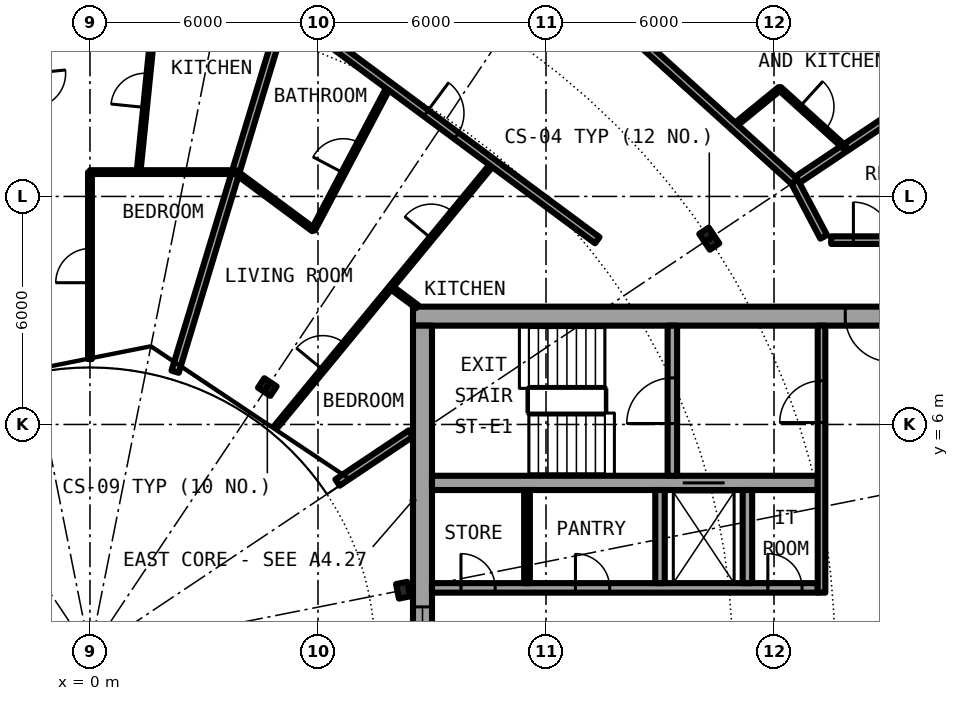
"""IFC4 building model, lengths in metres.
Left out: names, types, materials, properties, quantities, classifications, styles, units other than length and angle.
Written with IfcOpenShell. Run it as: python <this file> out.ifc"""

import sys

from ifc_helpers import new_model, si_unit, direction, frame, frame_2d, origin, origin_2d, place, context, subcontext, project, spatial, rectangle, i_section, extrude, element, fill, save


model = new_model("IFC4")
c1 = context("Model", 3, precision=1e-05, world=origin(), true_north=direction((0.0, 1.0)))
c2 = subcontext(c1, "Body", "Model", "MODEL_VIEW")
j1 = project(units=[si_unit("LENGTHUNIT", "METRE"), si_unit("PLANEANGLEUNIT", "RADIAN")], contexts=[c1])
p1 = place(None, origin())
s1 = spatial("IfcSite", under=j1, at=p1, CompositionType="ELEMENT")
p2 = place(p1, origin())
s2 = spatial("IfcBuilding", under=s1, at=p2, CompositionType="ELEMENT")
p3 = place(p2, frame((0.0, 0.0, 154.35)))
s3 = spatial("IfcBuildingStorey", under=s2, at=p3, CompositionType="ELEMENT", Elevation=154.35)
p4 = place(p3, frame((16.297, 10.889, 0.0), z_axis=(0.0, 0.0, 1.0), x_axis=(0.831469612303, 0.55557023302, 0.0)))
e1 = element("IfcColumn", 1, at=p4, inside=s3, PredefinedType="COLUMN", context=c2, shape_type="SweptSolid", body=[
    extrude(i_section(OverallWidth=0.3, OverallDepth=0.5, WebThickness=0.014, FlangeThickness=0.028, FilletRadius=0.027, at=origin_2d()), origin(), (0.0, 0.0, 1.0), 3.05),
])
for number, where, z_axis, x_axis in (
    (2, (8.239, 1.639, 0.0), (0.0, 0.0, 1.0), (0.981, 0.195, 0.0)),
    (3, (4.667, 6.984, 0.0), (0.0, 0.0, 1.0), (0.556, 0.831, 0.0)),
):
    element("IfcColumn", number, at=place(p3, frame(where, z_axis=z_axis, x_axis=x_axis)), inside=s3, PredefinedType="COLUMN", context=c2, shape_type="SweptSolid", body=[
        extrude(i_section(OverallWidth=0.3, OverallDepth=0.39, WebThickness=0.011, FlangeThickness=0.019, FilletRadius=0.027, at=origin_2d()), origin(), (0.0, 0.0, 1.0), 3.05),
    ])
p5 = place(p3, frame((22.699, 15.167, 0.0), z_axis=(0.0, 0.0, 1.0), x_axis=(-0.634382322723, 0.773019449054, 0.0)))
e4 = element("IfcWall", 4, at=p5, inside=s3, PredefinedType="SOLIDWALL", context=c2, shape_type="SweptSolid", body=[
    extrude(rectangle(XDim=5.352, YDim=0.25, at=frame_2d((2.676, 0.0))), origin(), (0.0, 0.0, 1.0), 2.7),
])
p6 = place(p5, frame((0.841, 0.0, 0.0)))
e5 = element("IfcOpeningElement", 5, at=p6, cuts=e4, PredefinedType="OPENING", context=c2, shape_type="SweptSolid", body=[
    extrude(rectangle(XDim=1.0, YDim=2.2, at=frame_2d((0.5, 1.1))), frame((0.0, 0.135, 0.0), z_axis=(0.0, -1.0, 0.0), x_axis=(1.0, 0.0, 0.0)), (0.0, 0.0, 1.0), 0.27),
])
p7 = place(p5, frame((3.111, 0.0, 0.3)))
e6 = element("IfcOpeningElement", 6, at=p7, cuts=e4, PredefinedType="OPENING", context=c2, shape_type="SweptSolid", body=[
    extrude(rectangle(XDim=1.8, YDim=2.1, at=frame_2d((0.9, 1.05))), frame((0.0, 0.135, 0.0), z_axis=(0.0, -1.0, 0.0), x_axis=(1.0, 0.0, 0.0)), (0.0, 0.0, 1.0), 0.27),
])
p8 = place(p3, frame((22.1, 8.85, 0.0), z_axis=(0.0, 0.0, 1.0), x_axis=(-1.0, 0.0, 0.0)))
e7 = element("IfcWall", 7, at=p8, inside=s3, PredefinedType="SHEAR", context=c2, shape_type="SweptSolid", body=[
    extrude(rectangle(XDim=13.6, YDim=0.5, at=frame_2d((6.8, 0.0))), origin(), (0.0, 0.0, 1.0), 3.05),
])
p9 = place(p8, frame((1.025, 0.0, 0.0)))
e8 = element("IfcOpeningElement", 8, at=p9, cuts=e7, PredefinedType="OPENING", context=c2, shape_type="SweptSolid", body=[
    extrude(rectangle(XDim=1.2, YDim=2.3, at=frame_2d((0.6, 1.15))), frame((0.0, 0.26, 0.0), z_axis=(0.0, -1.0, 0.0), x_axis=(1.0, 0.0, 0.0)), (0.0, 0.0, 1.0), 0.52),
])
p10 = place(p3, frame((8.75, -8.6, 0.0), z_axis=(0.0, 0.0, 1.0), x_axis=(0.0, 1.0, 0.0)))
e9 = element("IfcWall", 9, at=p10, inside=s3, PredefinedType="SHEAR", context=c2, shape_type="SweptSolid", body=[
    extrude(rectangle(XDim=17.2, YDim=0.5, at=frame_2d((8.6, 0.0))), origin(), (0.0, 0.0, 1.0), 3.05),
])
p11 = place(p10, frame((7.4, 0.0, 0.1)))
e10 = element("IfcOpeningElement", 10, at=p11, cuts=e9, PredefinedType="OPENING", context=c2, shape_type="SweptSolid", body=[
    extrude(rectangle(XDim=2.4, YDim=2.2, at=frame_2d((1.2, 1.1))), frame((0.0, 0.26, 0.0), z_axis=(0.0, -1.0, 0.0), x_axis=(1.0, 0.0, 0.0)), (0.0, 0.0, 1.0), 0.52),
])
p12 = place(p3, frame((9.0, 1.7, 0.0), z_axis=(0.0, 0.0, 1.0), x_axis=(1.0, 0.0, 0.0)))
e11 = element("IfcWall", 11, at=p12, inside=s3, PredefinedType="SHEAR", context=c2, shape_type="SweptSolid", body=[
    extrude(rectangle(XDim=10.15, YDim=0.25, at=frame_2d((5.075, 0.0))), origin(), (0.0, 0.0, 1.0), 3.05),
])
p13 = place(p12, frame((0.762, 0.0, 0.0)))
e12 = element("IfcOpeningElement", 12, at=p13, cuts=e11, PredefinedType="OPENING", context=c2, shape_type="SweptSolid", body=[
    extrude(rectangle(XDim=0.9, YDim=2.3, at=frame_2d((0.45, 1.15))), frame((0.0, 0.135, 0.0), z_axis=(0.0, -1.0, 0.0), x_axis=(1.0, 0.0, 0.0)), (0.0, 0.0, 1.0), 0.27),
])
p14 = place(p12, frame((3.775, 0.0, 0.0)))
e13 = element("IfcOpeningElement", 13, at=p14, cuts=e11, PredefinedType="OPENING", context=c2, shape_type="SweptSolid", body=[
    extrude(rectangle(XDim=0.9, YDim=2.3, at=frame_2d((0.45, 1.15))), frame((0.0, 0.135, 0.0), z_axis=(0.0, -1.0, 0.0), x_axis=(1.0, 0.0, 0.0)), (0.0, 0.0, 1.0), 0.27),
])
p15 = place(p12, frame((8.837, 0.0, 0.0)))
e14 = element("IfcOpeningElement", 14, at=p15, cuts=e11, PredefinedType="OPENING", context=c2, shape_type="SweptSolid", body=[
    extrude(rectangle(XDim=0.9, YDim=2.3, at=frame_2d((0.45, 1.15))), frame((0.0, 0.135, 0.0), z_axis=(0.0, -1.0, 0.0), x_axis=(1.0, 0.0, 0.0)), (0.0, 0.0, 1.0), 0.27),
])
p16 = place(p3, frame((9.0, 4.462, 0.0), z_axis=(0.0, 0.0, 1.0), x_axis=(1.0, 0.0, 0.0)))
e15 = element("IfcWall", 15, at=p16, inside=s3, PredefinedType="SHEAR", context=c2, shape_type="SweptSolid", body=[
    extrude(rectangle(XDim=10.15, YDim=0.375, at=frame_2d((5.075, 0.0))), origin(), (0.0, 0.0, 1.0), 3.05),
])
p17 = place(p16, frame((6.6, 0.0, 0.0)))
e16 = element("IfcOpeningElement", 16, at=p17, cuts=e15, PredefinedType="OPENING", context=c2, shape_type="SweptSolid", body=[
    extrude(rectangle(XDim=1.1, YDim=2.3, at=frame_2d((0.55, 1.15))), frame((0.0, 0.198, 0.0), z_axis=(0.0, -1.0, 0.0), x_axis=(1.0, 0.0, 0.0)), (0.0, 0.0, 1.0), 0.395),
])
p18 = place(p3, frame((15.325, 4.65, 0.0), z_axis=(0.0, 0.0, 1.0), x_axis=(0.0, 1.0, 0.0)))
e17 = element("IfcWall", 17, at=p18, inside=s3, PredefinedType="SHEAR", context=c2, shape_type="SweptSolid", body=[
    extrude(rectangle(XDim=3.95, YDim=0.25, at=frame_2d((1.975, 0.0))), origin(), (0.0, 0.0, 1.0), 3.05),
])
p19 = place(p18, frame((1.375, 0.0, 0.0)))
e18 = element("IfcOpeningElement", 18, at=p19, cuts=e17, PredefinedType="OPENING", context=c2, shape_type="SweptSolid", body=[
    extrude(rectangle(XDim=1.2, YDim=2.3, at=frame_2d((0.6, 1.15))), frame((0.0, 0.135, 0.0), z_axis=(0.0, -1.0, 0.0), x_axis=(1.0, 0.0, 0.0)), (0.0, 0.0, 1.0), 0.27),
])
for number, where, z_axis, x_axis in (
    (19, (15.0, 1.825, 0.0), (0.0, 0.0, 1.0), (0.0, 1.0, 0.0)),
    (20, (17.3, 1.825, 0.0), (0.0, 0.0, 1.0), (0.0, 1.0, 0.0)),
):
    element("IfcWall", number, at=place(p3, frame(where, z_axis=z_axis, x_axis=x_axis)), inside=s3, PredefinedType="SOLIDWALL", context=c2, shape_type="SweptSolid", body=[
        extrude(rectangle(XDim=2.45, YDim=0.25, at=frame_2d((1.225, 0.0))), origin(), (0.0, 0.0, 1.0), 2.7),
    ])
p20 = place(p3, frame((19.25, 1.575, 0.0), z_axis=(0.0, 0.0, 1.0), x_axis=(0.0, 1.0, 0.0)))
e21 = element("IfcWall", 21, at=p20, inside=s3, PredefinedType="SOLIDWALL", context=c2, shape_type="SweptSolid", body=[
    extrude(rectangle(XDim=7.025, YDim=0.2, at=frame_2d((3.513, 0.0))), origin(), (0.0, 0.0, 1.0), 2.7),
])
p21 = place(p20, frame((4.475, 0.0, 0.0)))
e22 = element("IfcOpeningElement", 22, at=p21, cuts=e21, PredefinedType="OPENING", context=c2, shape_type="SweptSolid", body=[
    extrude(rectangle(XDim=1.1, YDim=2.3, at=frame_2d((0.55, 1.15))), frame((0.0, 0.11, 0.0), z_axis=(0.0, -1.0, 0.0), x_axis=(1.0, 0.0, 0.0)), (0.0, 0.0, 1.0), 0.22),
])
p22 = place(p3, frame((11.5, 1.825, 0.0), z_axis=(0.0, 0.0, 1.0), x_axis=(0.0, 1.0, 0.0)))
e23 = element("IfcWall", 23, at=p22, inside=s3, PredefinedType="PARTITIONING", context=c2, shape_type="SweptSolid", body=[
    extrude(rectangle(XDim=2.45, YDim=0.15, at=frame_2d((1.225, 0.0))), origin(), (0.0, 0.0, 1.0), 2.7),
])
p23 = place(p3, frame((0.0, 7.72, 0.0), z_axis=(0.0, 0.0, 1.0), x_axis=(0.0, 1.0, 0.0)))
e24 = element("IfcWall", 24, at=p23, inside=s3, PredefinedType="PARTITIONING", context=c2, shape_type="SweptSolid", body=[
    extrude(rectangle(XDim=4.92, YDim=0.1, at=frame_2d((2.46, 0.0))), origin(), (0.0, 0.0, 1.0), 2.7),
])
p24 = place(p23, frame((2.01, 0.0, 0.0)))
e25 = element("IfcOpeningElement", 25, at=p24, cuts=e24, PredefinedType="OPENING", context=c2, shape_type="SweptSolid", body=[
    extrude(rectangle(XDim=0.9, YDim=2.3, at=frame_2d((0.45, 1.15))), frame((0.0, 0.06, 0.0), z_axis=(0.0, -1.0, 0.0), x_axis=(1.0, 0.0, 0.0)), (0.0, 0.0, 1.0), 0.12),
])
p25 = place(p3, frame((1.278, 12.64, 0.0), z_axis=(0.0, 0.0, 1.0), x_axis=(0.100650711003, 0.994921823248, 0.0)))
e26 = element("IfcWall", 26, at=p25, inside=s3, PredefinedType="PARTITIONING", context=c2, shape_type="SweptSolid", body=[
    extrude(rectangle(XDim=4.32, YDim=0.1, at=frame_2d((2.16, 0.0))), origin(), (0.0, 0.0, 1.0), 2.7),
])
p26 = place(p25, frame((1.71, 0.0, 0.0)))
e27 = element("IfcOpeningElement", 27, at=p26, cuts=e26, PredefinedType="OPENING", context=c2, shape_type="SweptSolid", body=[
    extrude(rectangle(XDim=0.9, YDim=2.3, at=frame_2d((0.45, 1.15))), frame((0.0, 0.06, 0.0), z_axis=(0.0, -1.0, 0.0), x_axis=(1.0, 0.0, 0.0)), (0.0, 0.0, 1.0), 0.12),
])
p27 = place(p3, frame((2.241, 7.388, 0.0), z_axis=(0.0, 0.0, 1.0), x_axis=(0.290284403441, 0.956940418793, 0.0)))
e28 = element("IfcWall", 28, at=p27, inside=s3, PredefinedType="PARTITIONING", context=c2, shape_type="SweptSolid", body=[
    extrude(rectangle(XDim=9.98, YDim=0.2, at=frame_2d((4.99, 0.0))), origin(), (0.0, 0.0, 1.0), 2.7),
])
p28 = place(p3, frame((4.909, 5.958, 0.0), z_axis=(0.0, 0.0, 1.0), x_axis=(0.635879010442, 0.771788756124, 0.0)))
e29 = element("IfcWall", 29, at=p28, inside=s3, PredefinedType="PARTITIONING", context=c2, shape_type="SweptSolid", body=[
    extrude(rectangle(XDim=8.967, YDim=0.1, at=frame_2d((4.484, 0.0))), origin(), (0.0, 0.0, 1.0), 2.7),
])
p29 = place(p28, frame((6.4, 0.0, 0.0)))
e30 = element("IfcOpeningElement", 30, at=p29, cuts=e29, PredefinedType="OPENING", context=c2, shape_type="SweptSolid", body=[
    extrude(rectangle(XDim=0.9, YDim=2.3, at=frame_2d((0.45, 1.15))), frame((0.0, 0.06, 0.0), z_axis=(0.0, -1.0, 0.0), x_axis=(1.0, 0.0, 0.0)), (0.0, 0.0, 1.0), 0.12),
])
p30 = place(p28, frame((1.917, 0.0, 0.0)))
e31 = element("IfcOpeningElement", 31, at=p30, cuts=e29, PredefinedType="OPENING", context=c2, shape_type="SweptSolid", body=[
    extrude(rectangle(XDim=0.9, YDim=2.3, at=frame_2d((0.45, 1.15))), frame((0.0, 0.06, 0.0), z_axis=(0.0, -1.0, 0.0), x_axis=(1.0, 0.0, 0.0)), (0.0, 0.0, 1.0), 0.12),
])
p31 = place(p3, frame((5.877, 11.125, 0.0), z_axis=(0.0, 0.0, 1.0), x_axis=(0.467030118529, 0.884241408432, 0.0)))
e32 = element("IfcWall", 32, at=p31, inside=s3, PredefinedType="PARTITIONING", context=c2, shape_type="SweptSolid", body=[
    extrude(rectangle(XDim=4.278, YDim=0.1, at=frame_2d((2.139, 0.0))), origin(), (0.0, 0.0, 1.0), 2.7),
])
p32 = place(p31, frame((1.689, 0.0, 0.0)))
e33 = element("IfcOpeningElement", 33, at=p32, cuts=e32, PredefinedType="OPENING", context=c2, shape_type="SweptSolid", body=[
    extrude(rectangle(XDim=0.9, YDim=2.3, at=frame_2d((0.45, 1.15))), frame((0.0, 0.06, 0.0), z_axis=(0.0, -1.0, 0.0), x_axis=(1.0, 0.0, 0.0)), (0.0, 0.0, 1.0), 0.12),
])
p33 = place(p3, frame((16.936, 13.845, 0.0), z_axis=(0.0, 0.0, 1.0), x_axis=(0.774283039722, 0.632839453889, 0.0)))
e34 = element("IfcWall", 34, at=p33, inside=s3, PredefinedType="PARTITIONING", context=c2, shape_type="SweptSolid", body=[
    extrude(rectangle(XDim=1.569, YDim=0.1, at=frame_2d((0.785, 0.0))), origin(), (0.0, 0.0, 1.0), 2.7),
])
p34 = place(p3, frame((18.542, 12.389, 0.0), z_axis=(0.0, 0.0, 1.0), x_axis=(0.831387096605, 0.55569370664, 0.0)))
e35 = element("IfcWall", 35, at=p34, inside=s3, PredefinedType="PARTITIONING", context=c2, shape_type="SweptSolid", body=[
    extrude(rectangle(XDim=4.875, YDim=0.2, at=frame_2d((2.438, 0.0))), origin(), (0.0, 0.0, 1.0), 2.7),
])
p35 = place(p3, frame((6.513, 4.472, 0.0), z_axis=(0.0, 0.0, 1.0), x_axis=(0.83133816625, 0.555766905579, 0.0)))
e36 = element("IfcWall", 36, at=p35, inside=s3, PredefinedType="PARTITIONING", context=c2, shape_type="SweptSolid", body=[
    extrude(rectangle(XDim=2.323, YDim=0.2, at=frame_2d((1.162, 0.0))), origin(), (0.0, 0.0, 1.0), 2.7),
])
p36 = place(p3, frame((19.504, 10.85, 0.0), z_axis=(0.0, 0.0, 1.0), x_axis=(1.0, 0.0, 0.0)))
e37 = element("IfcWall", 37, at=p36, inside=s3, PredefinedType="PARTITIONING", context=c2, shape_type="SweptSolid", body=[
    extrude(rectangle(XDim=2.171, YDim=0.2, at=frame_2d((1.085, 0.0))), origin(), (0.0, 0.0, 1.0), 2.7),
])
p37 = place(p36, frame((0.585, 0.0, 0.0)))
e38 = element("IfcOpeningElement", 38, at=p37, cuts=e37, PredefinedType="OPENING", context=c2, shape_type="SweptSolid", body=[
    extrude(rectangle(XDim=1.0, YDim=2.3, at=frame_2d((0.5, 1.15))), frame((0.0, 0.11, 0.0), z_axis=(0.0, -1.0, 0.0), x_axis=(1.0, 0.0, 0.0)), (0.0, 0.0, 1.0), 0.22),
])
p38 = place(p3, frame((3.834, 12.64, 0.0), z_axis=(0.0, 0.0, 1.0), x_axis=(0.803259509791, -0.595629213463, 0.0)))
e39 = element("IfcWall", 39, at=p38, inside=s3, PredefinedType="PARTITIONING", context=c2, shape_type="SweptSolid", body=[
    extrude(rectangle(XDim=2.543, YDim=0.1, at=frame_2d((1.272, 0.0))), origin(), (0.0, 0.0, 1.0), 2.7),
])
p39 = place(p3, frame((7.918, 9.611, 0.0), z_axis=(0.0, 0.0, 1.0), x_axis=(0.803199066515, -0.595710718007, 0.0)))
e40 = element("IfcWall", 40, at=p39, inside=s3, PredefinedType="PARTITIONING", context=c2, shape_type="SweptSolid", body=[
    extrude(rectangle(XDim=0.858, YDim=0.1, at=frame_2d((0.429, 0.0))), origin(), (0.0, 0.0, 1.0), 2.7),
])
p40 = place(p3, frame((0.0, 12.64, 0.0), z_axis=(0.0, 0.0, 1.0), x_axis=(1.0, 0.0, 0.0)))
e41 = element("IfcWall", 41, at=p40, inside=s3, PredefinedType="PARTITIONING", context=c2, shape_type="SweptSolid", body=[
    extrude(rectangle(XDim=3.834, YDim=0.1, at=frame_2d((1.917, 0.0))), origin(), (0.0, 0.0, 1.0), 2.7),
])
p41 = place(p3, frame((5.137, 16.938, 0.0), z_axis=(0.0, 0.0, 1.0), x_axis=(0.803229232922, -0.595670042371, 0.0)))
e42 = element("IfcWall", 42, at=p41, inside=s3, PredefinedType="PARTITIONING", context=c2, shape_type="SweptSolid", body=[
    extrude(rectangle(XDim=10.224, YDim=0.2, at=frame_2d((5.112, 0.0))), origin(), (0.0, 0.0, 1.0), 2.7),
])
p42 = place(p41, frame((4.612, 0.0, 0.0)))
e43 = element("IfcOpeningElement", 43, at=p42, cuts=e42, PredefinedType="OPENING", context=c2, shape_type="SweptSolid", body=[
    extrude(rectangle(XDim=1.0, YDim=2.3, at=frame_2d((0.5, 1.15))), frame((0.0, 0.11, 0.0), z_axis=(0.0, -1.0, 0.0), x_axis=(1.0, 0.0, 0.0)), (0.0, 0.0, 1.0), 0.22),
])
p43 = place(p3, frame((10.512, 19.667, 0.0), z_axis=(0.0, 0.0, 1.0), x_axis=(0.740947367223, -0.671563101283, 0.0)))
e44 = element("IfcWall", 44, at=p43, inside=s3, PredefinedType="PARTITIONING", context=c2, shape_type="SweptSolid", body=[
    extrude(rectangle(XDim=10.837, YDim=0.2, at=frame_2d((5.419, 0.0))), origin(), (0.0, 0.0, 1.0), 2.7),
])
p44 = place(p43, frame((3.835, 0.0, 0.0)))
e45 = element("IfcOpeningElement", 45, at=p44, cuts=e44, PredefinedType="OPENING", context=c2, shape_type="SweptSolid", body=[
    extrude(rectangle(XDim=1.0, YDim=2.3, at=frame_2d((0.5, 1.15))), frame((0.0, 0.11, 0.0), z_axis=(0.0, -1.0, 0.0), x_axis=(1.0, 0.0, 0.0)), (0.0, 0.0, 1.0), 0.22),
])
p45 = place(p3, frame((18.542, 12.389, 0.0), z_axis=(0.0, 0.0, 1.0), x_axis=(0.465605550524, -0.884992356646, 0.0)))
e46 = element("IfcWall", 46, at=p45, inside=s3, PredefinedType="PARTITIONING", context=c2, shape_type="SweptSolid", body=[
    extrude(rectangle(XDim=1.643, YDim=0.2, at=frame_2d((0.821, 0.0))), origin(), (0.0, 0.0, 1.0), 2.7),
])
p46 = place(p3, frame((18.149, 14.84, 0.0), z_axis=(0.0, 0.0, 1.0), x_axis=(0.741127434804, -0.671364376014, 0.0)))
e47 = element("IfcWall", 47, at=p46, inside=s3, PredefinedType="PARTITIONING", context=c2, shape_type="SweptSolid", body=[
    extrude(rectangle(XDim=2.324, YDim=0.1, at=frame_2d((1.162, 0.0))), origin(), (0.0, 0.0, 1.0), 2.7),
])
p47 = place(p46, frame((0.714, 0.0, 0.0)))
e48 = element("IfcOpeningElement", 48, at=p47, cuts=e47, PredefinedType="OPENING", context=c2, shape_type="SweptSolid", body=[
    extrude(rectangle(XDim=0.9, YDim=2.3, at=frame_2d((0.45, 1.15))), frame((0.0, 0.06, 0.0), z_axis=(0.0, -1.0, 0.0), x_axis=(1.0, 0.0, 0.0)), (0.0, 0.0, 1.0), 0.12),
])
p48 = place(p17, origin())
e49 = element("IfcDoor", 49, at=p48, inside=s3, OperationType="DOUBLE_DOOR_SLIDING", PredefinedType="DOOR", context=c2, shape_type="SweptSolid", body=[
    extrude(rectangle(XDim=1.1, YDim=2.3, at=frame_2d((0.55, 1.15))), frame((0.0, 0.025, 0.0), z_axis=(0.0, -1.0, 0.0), x_axis=(1.0, 0.0, 0.0)), (0.0, 0.0, 1.0), 0.05),
])
fill(e16, e49)
p49 = place(p13, origin())
e50 = element("IfcDoor", 50, at=p49, inside=s3, OperationType="SINGLE_SWING_RIGHT", PredefinedType="DOOR", context=c2, shape_type="SweptSolid", body=[
    extrude(rectangle(XDim=0.9, YDim=2.3, at=frame_2d((0.45, 1.15))), frame((0.0, 0.025, 0.0), z_axis=(0.0, -1.0, 0.0), x_axis=(1.0, 0.0, 0.0)), (0.0, 0.0, 1.0), 0.05),
])
fill(e12, e50)
p50 = place(p14, origin())
e51 = element("IfcDoor", 51, at=p50, inside=s3, OperationType="SINGLE_SWING_RIGHT", PredefinedType="DOOR", context=c2, shape_type="SweptSolid", body=[
    extrude(rectangle(XDim=0.9, YDim=2.3, at=frame_2d((0.45, 1.15))), frame((0.0, 0.025, 0.0), z_axis=(0.0, -1.0, 0.0), x_axis=(1.0, 0.0, 0.0)), (0.0, 0.0, 1.0), 0.05),
])
fill(e13, e51)
p51 = place(p15, origin())
e52 = element("IfcDoor", 52, at=p51, inside=s3, OperationType="SINGLE_SWING_LEFT", PredefinedType="DOOR", context=c2, shape_type="SweptSolid", body=[
    extrude(rectangle(XDim=0.9, YDim=2.3, at=frame_2d((0.45, 1.15))), frame((0.0, 0.025, 0.0), z_axis=(0.0, -1.0, 0.0), x_axis=(1.0, 0.0, 0.0)), (0.0, 0.0, 1.0), 0.05),
])
fill(e14, e52)
p52 = place(p19, origin())
e53 = element("IfcDoor", 53, at=p52, inside=s3, OperationType="SINGLE_SWING_LEFT", PredefinedType="DOOR", context=c2, shape_type="SweptSolid", body=[
    extrude(rectangle(XDim=1.2, YDim=2.3, at=frame_2d((0.6, 1.15))), frame((0.0, 0.025, 0.0), z_axis=(0.0, -1.0, 0.0), x_axis=(1.0, 0.0, 0.0)), (0.0, 0.0, 1.0), 0.05),
])
fill(e18, e53)
p53 = place(p21, origin())
e54 = element("IfcDoor", 54, at=p53, inside=s3, OperationType="SINGLE_SWING_LEFT", PredefinedType="DOOR", context=c2, shape_type="SweptSolid", body=[
    extrude(rectangle(XDim=1.1, YDim=2.3, at=frame_2d((0.55, 1.15))), frame((0.0, 0.025, 0.0), z_axis=(0.0, -1.0, 0.0), x_axis=(1.0, 0.0, 0.0)), (0.0, 0.0, 1.0), 0.05),
])
fill(e22, e54)
p54 = place(p9, origin())
e55 = element("IfcDoor", 55, at=p54, inside=s3, OperationType="SINGLE_SWING_RIGHT", PredefinedType="DOOR", context=c2, shape_type="SweptSolid", body=[
    extrude(rectangle(XDim=1.2, YDim=2.3, at=frame_2d((0.6, 1.15))), frame((0.0, 0.025, 0.0), z_axis=(0.0, -1.0, 0.0), x_axis=(1.0, 0.0, 0.0)), (0.0, 0.0, 1.0), 0.05),
])
fill(e8, e55)
p55 = place(p11, origin())
e56 = element("IfcWindow", 56, at=p55, inside=s3, PartitioningType="SINGLE_PANEL", PredefinedType="WINDOW", context=c2, shape_type="SweptSolid", body=[
    extrude(rectangle(XDim=2.4, YDim=2.2, at=frame_2d((1.2, 1.1))), frame((0.0, 0.03, 0.0), z_axis=(0.0, -1.0, 0.0), x_axis=(1.0, 0.0, 0.0)), (0.0, 0.0, 1.0), 0.06),
])
fill(e10, e56)
p56 = place(p47, origin())
e57 = element("IfcDoor", 57, at=p56, inside=s3, OperationType="SINGLE_SWING_RIGHT", PredefinedType="DOOR", context=c2, shape_type="SweptSolid", body=[
    extrude(rectangle(XDim=0.9, YDim=2.3, at=frame_2d((0.45, 1.15))), frame((0.0, 0.025, 0.0), z_axis=(0.0, -1.0, 0.0), x_axis=(1.0, 0.0, 0.0)), (0.0, 0.0, 1.0), 0.05),
])
fill(e48, e57)
p57 = place(p42, origin())
e58 = element("IfcDoor", 58, at=p57, inside=s3, OperationType="SINGLE_SWING_RIGHT", PredefinedType="DOOR", context=c2, shape_type="SweptSolid", body=[
    extrude(rectangle(XDim=1.0, YDim=2.3, at=frame_2d((0.5, 1.15))), frame((0.0, 0.025, 0.0), z_axis=(0.0, -1.0, 0.0), x_axis=(1.0, 0.0, 0.0)), (0.0, 0.0, 1.0), 0.05),
])
fill(e43, e58)
p58 = place(p32, origin())
e59 = element("IfcDoor", 59, at=p58, inside=s3, OperationType="SINGLE_SWING_RIGHT", PredefinedType="DOOR", context=c2, shape_type="SweptSolid", body=[
    extrude(rectangle(XDim=0.9, YDim=2.3, at=frame_2d((0.45, 1.15))), frame((0.0, 0.025, 0.0), z_axis=(0.0, -1.0, 0.0), x_axis=(1.0, 0.0, 0.0)), (0.0, 0.0, 1.0), 0.05),
])
fill(e33, e59)
p59 = place(p29, origin())
e60 = element("IfcDoor", 60, at=p59, inside=s3, OperationType="SINGLE_SWING_RIGHT", PredefinedType="DOOR", context=c2, shape_type="SweptSolid", body=[
    extrude(rectangle(XDim=0.9, YDim=2.3, at=frame_2d((0.45, 1.15))), frame((0.0, 0.025, 0.0), z_axis=(0.0, -1.0, 0.0), x_axis=(1.0, 0.0, 0.0)), (0.0, 0.0, 1.0), 0.05),
])
fill(e30, e60)
p60 = place(p30, origin())
e61 = element("IfcDoor", 61, at=p60, inside=s3, OperationType="SINGLE_SWING_LEFT", PredefinedType="DOOR", context=c2, shape_type="SweptSolid", body=[
    extrude(rectangle(XDim=0.9, YDim=2.3, at=frame_2d((0.45, 1.15))), frame((0.0, 0.025, 0.0), z_axis=(0.0, -1.0, 0.0), x_axis=(1.0, 0.0, 0.0)), (0.0, 0.0, 1.0), 0.05),
])
fill(e31, e61)
p61 = place(p26, origin())
e62 = element("IfcDoor", 62, at=p61, inside=s3, OperationType="SINGLE_SWING_RIGHT", PredefinedType="DOOR", context=c2, shape_type="SweptSolid", body=[
    extrude(rectangle(XDim=0.9, YDim=2.3, at=frame_2d((0.45, 1.15))), frame((0.0, 0.025, 0.0), z_axis=(0.0, -1.0, 0.0), x_axis=(1.0, 0.0, 0.0)), (0.0, 0.0, 1.0), 0.05),
])
fill(e27, e62)
p62 = place(p24, origin())
e63 = element("IfcDoor", 63, at=p62, inside=s3, OperationType="SINGLE_SWING_RIGHT", PredefinedType="DOOR", context=c2, shape_type="SweptSolid", body=[
    extrude(rectangle(XDim=0.9, YDim=2.3, at=frame_2d((0.45, 1.15))), frame((0.0, 0.025, 0.0), z_axis=(0.0, -1.0, 0.0), x_axis=(1.0, 0.0, 0.0)), (0.0, 0.0, 1.0), 0.05),
])
fill(e25, e63)
p63 = place(p37, origin())
e64 = element("IfcDoor", 64, at=p63, inside=s3, OperationType="SINGLE_SWING_LEFT", PredefinedType="DOOR", context=c2, shape_type="SweptSolid", body=[
    extrude(rectangle(XDim=1.0, YDim=2.3, at=frame_2d((0.5, 1.15))), frame((0.0, 0.025, 0.0), z_axis=(0.0, -1.0, 0.0), x_axis=(1.0, 0.0, 0.0)), (0.0, 0.0, 1.0), 0.05),
])
fill(e38, e64)
save(model, sys.argv[1])
